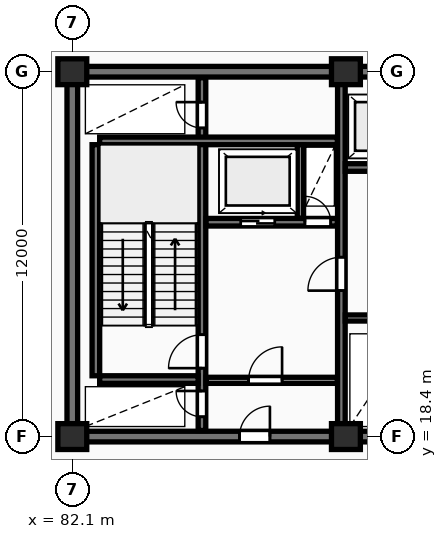
"""IFC4 building model, lengths in metres.
Left out: names, types, materials, properties, quantities, classifications, styles, units other than length and angle.
Written with IfcOpenShell. Run it as: python <this file> out.ifc"""

import sys

from ifc_helpers import new_model, si_unit, direction, frame, frame_2d, origin, origin_2d, place, context, subcontext, project, spatial, rectangle, extrude, element, fill, save


model = new_model("IFC4")
c1 = context("Model", 3, precision=1e-05, world=origin(), true_north=direction((0.0, 1.0)))
c2 = subcontext(c1, "Body", "Model", "MODEL_VIEW")
j1 = project(units=[si_unit("LENGTHUNIT", "METRE"), si_unit("PLANEANGLEUNIT", "RADIAN")], contexts=[c1])
p1 = place(None, origin())
s1 = spatial("IfcSite", under=j1, at=p1, CompositionType="ELEMENT")
p2 = place(p1, origin())
s2 = spatial("IfcBuilding", under=s1, at=p2, CompositionType="ELEMENT")
p3 = place(p2, frame((0.0, 0.0, 76.0)))
s3 = spatial("IfcBuildingStorey", under=s2, at=p3, CompositionType="ELEMENT", Elevation=76.0)
for number, where, z_axis, x_axis in (
    (1, (82.1, 18.4, 0.0), (0.0, 0.0, 1.0), (1.0, 0.0, 0.0)),
    (2, (82.1, 30.4, 0.0), (0.0, 0.0, 1.0), (1.0, 0.0, 0.0)),
    (3, (91.1, 18.4, 0.0), (0.0, 0.0, 1.0), (1.0, 0.0, 0.0)),
    (4, (91.1, 30.4, 0.0), (0.0, 0.0, 1.0), (1.0, 0.0, 0.0)),
):
    element("IfcColumn", number, at=place(p3, frame(where, z_axis=z_axis, x_axis=x_axis)), inside=s3, PredefinedType="COLUMN", context=c2, shape_type="SweptSolid", body=[
        extrude(rectangle(XDim=0.95, YDim=0.85, at=origin_2d()), origin(), (0.0, 0.0, 1.0), 4.8),
    ])
p4 = place(p3, frame((81.925, 30.4, 0.0), z_axis=(0.0, 0.0, 1.0), x_axis=(1.0, 0.0, 0.0)))
e5 = element("IfcWall", 5, at=p4, inside=s3, PredefinedType="SHEAR", context=c2, shape_type="SweptSolid", body=[
    extrude(rectangle(XDim=36.265, YDim=0.35, at=frame_2d((18.132, 0.0))), origin(), (0.0, 0.0, 1.0), 4.8),
])
p5 = place(p3, frame((82.1, 18.575, 0.0), z_axis=(0.0, 0.0, 1.0), x_axis=(0.0, 1.0, 0.0)))
e6 = element("IfcWall", 6, at=p5, inside=s3, PredefinedType="SHEAR", context=c2, shape_type="SweptSolid", body=[
    extrude(rectangle(XDim=11.65, YDim=0.35, at=frame_2d((5.825, 0.0))), origin(), (0.0, 0.0, 1.0), 4.8),
])
p6 = place(p3, frame((81.925, 18.4, 0.0), z_axis=(0.0, 0.0, 1.0), x_axis=(1.0, 0.0, 0.0)))
e7 = element("IfcWall", 7, at=p6, inside=s3, PredefinedType="SHEAR", context=c2, shape_type="SweptSolid", body=[
    extrude(rectangle(XDim=36.265, YDim=0.35, at=frame_2d((18.132, 0.0))), origin(), (0.0, 0.0, 1.0), 4.8),
])
p7 = place(p6, frame((5.675, 0.0, 0.0)))
e8 = element("IfcOpeningElement", 8, at=p7, cuts=e7, PredefinedType="OPENING", context=c2, shape_type="SweptSolid", body=[
    extrude(rectangle(XDim=1.0, YDim=2.15, at=frame_2d((0.5, 1.075))), frame((0.0, 0.185, 0.0), z_axis=(0.0, -1.0, 0.0), x_axis=(1.0, 0.0, 0.0)), (0.0, 0.0, 1.0), 0.37),
])
p8 = place(p6, frame((21.925, 0.0, 0.0)))
e9 = element("IfcOpeningElement", 9, at=p8, cuts=e7, PredefinedType="OPENING", context=c2, shape_type="SweptSolid", body=[
    extrude(rectangle(XDim=1.5, YDim=2.2, at=frame_2d((0.75, 1.1))), frame((0.0, 0.185, 0.0), z_axis=(0.0, -1.0, 0.0), x_axis=(1.0, 0.0, 0.0)), (0.0, 0.0, 1.0), 0.37),
])
p9 = place(p6, frame((29.875, 0.0, 0.0)))
e10 = element("IfcOpeningElement", 10, at=p9, cuts=e7, PredefinedType="OPENING", context=c2, shape_type="SweptSolid", body=[
    extrude(rectangle(XDim=1.0, YDim=2.15, at=frame_2d((0.5, 1.075))), frame((0.0, 0.185, 0.0), z_axis=(0.0, -1.0, 0.0), x_axis=(1.0, 0.0, 0.0)), (0.0, 0.0, 1.0), 0.37),
])
p10 = place(p3, frame((82.875, 20.4, 0.0), z_axis=(0.0, 0.0, 1.0), x_axis=(0.0, 1.0, 0.0)))
e11 = element("IfcWall", 11, at=p10, inside=s3, PredefinedType="SHEAR", context=c2, shape_type="SweptSolid", body=[
    extrude(rectangle(XDim=7.6, YDim=0.25, at=frame_2d((3.8, 0.0))), origin(), (0.0, 0.0, 1.0), 4.8),
])
p11 = place(p3, frame((86.365, 18.6, 0.0), z_axis=(0.0, 0.0, 1.0), x_axis=(0.0, 1.0, 0.0)))
e12 = element("IfcWall", 12, at=p11, inside=s3, PredefinedType="SHEAR", context=c2, shape_type="SweptSolid", body=[
    extrude(rectangle(XDim=11.6, YDim=0.25, at=frame_2d((5.8, 0.0))), origin(), (0.0, 0.0, 1.0), 4.8),
])
p12 = place(p11, frame((0.45, 0.0, 0.0)))
e13 = element("IfcOpeningElement", 13, at=p12, cuts=e12, PredefinedType="OPENING", context=c2, shape_type="SweptSolid", body=[
    extrude(rectangle(XDim=0.85, YDim=2.05, at=frame_2d((0.425, 1.025))), frame((0.0, 0.135, 0.0), z_axis=(0.0, -1.0, 0.0), x_axis=(1.0, 0.0, 0.0)), (0.0, 0.0, 1.0), 0.27),
])
p13 = place(p11, frame((2.05, 0.0, 0.0)))
e14 = element("IfcOpeningElement", 14, at=p13, cuts=e12, PredefinedType="OPENING", context=c2, shape_type="SweptSolid", body=[
    extrude(rectangle(XDim=1.1, YDim=2.1, at=frame_2d((0.55, 1.05))), frame((0.0, 0.135, 0.0), z_axis=(0.0, -1.0, 0.0), x_axis=(1.0, 0.0, 0.0)), (0.0, 0.0, 1.0), 0.27),
])
p14 = place(p11, frame((9.95, 0.0, 0.0)))
e15 = element("IfcOpeningElement", 15, at=p14, cuts=e12, PredefinedType="OPENING", context=c2, shape_type="SweptSolid", body=[
    extrude(rectangle(XDim=0.85, YDim=2.05, at=frame_2d((0.425, 1.025))), frame((0.0, 0.135, 0.0), z_axis=(0.0, -1.0, 0.0), x_axis=(1.0, 0.0, 0.0)), (0.0, 0.0, 1.0), 0.27),
])
p15 = place(p3, frame((83.0, 20.275, 0.0), z_axis=(0.0, 0.0, 1.0), x_axis=(1.0, 0.0, 0.0)))
e16 = element("IfcWall", 16, at=p15, inside=s3, PredefinedType="SHEAR", context=c2, shape_type="SweptSolid", body=[
    extrude(rectangle(XDim=3.24, YDim=0.25, at=frame_2d((1.62, 0.0))), origin(), (0.0, 0.0, 1.0), 4.8),
])
p16 = place(p3, frame((83.0, 28.125, 0.0), z_axis=(0.0, 0.0, 1.0), x_axis=(1.0, 0.0, 0.0)))
e17 = element("IfcWall", 17, at=p16, inside=s3, PredefinedType="SHEAR", context=c2, shape_type="SweptSolid", body=[
    extrude(rectangle(XDim=7.82, YDim=0.25, at=frame_2d((3.91, 0.0))), origin(), (0.0, 0.0, 1.0), 4.8),
])
p17 = place(p3, frame((86.5, 25.45, 0.0), z_axis=(0.0, 0.0, 1.0), x_axis=(1.0, 0.0, 0.0)))
e18 = element("IfcWall", 18, at=p17, inside=s3, PredefinedType="SHEAR", context=c2, shape_type="SweptSolid", body=[
    extrude(rectangle(XDim=4.32, YDim=0.25, at=frame_2d((2.16, 0.0))), origin(), (0.0, 0.0, 1.0), 4.8),
])
p18 = place(p17, frame((1.14, 0.0, 0.0)))
e19 = element("IfcOpeningElement", 19, at=p18, cuts=e18, PredefinedType="OPENING", context=c2, shape_type="SweptSolid", body=[
    extrude(rectangle(XDim=1.12, YDim=2.12, at=frame_2d((0.56, 1.06))), frame((0.0, 0.135, 0.0), z_axis=(0.0, -1.0, 0.0), x_axis=(1.0, 0.0, 0.0)), (0.0, 0.0, 1.0), 0.27),
])
p19 = place(p17, frame((3.25, 0.0, 0.0)))
e20 = element("IfcOpeningElement", 20, at=p19, cuts=e18, PredefinedType="OPENING", context=c2, shape_type="SweptSolid", body=[
    extrude(rectangle(XDim=0.85, YDim=2.05, at=frame_2d((0.425, 1.025))), frame((0.0, 0.135, 0.0), z_axis=(0.0, -1.0, 0.0), x_axis=(1.0, 0.0, 0.0)), (0.0, 0.0, 1.0), 0.27),
])
p20 = place(p3, frame((89.6, 25.58, 0.0), z_axis=(0.0, 0.0, 1.0), x_axis=(0.0, 1.0, 0.0)))
e21 = element("IfcWall", 21, at=p20, inside=s3, PredefinedType="PARTITIONING", context=c2, shape_type="SweptSolid", body=[
    extrude(rectangle(XDim=2.42, YDim=0.2, at=frame_2d((1.21, 0.0))), origin(), (0.0, 0.0, 1.0), 4.48),
])
p21 = place(p3, frame((86.5, 20.25, 0.0), z_axis=(0.0, 0.0, 1.0), x_axis=(1.0, 0.0, 0.0)))
e22 = element("IfcWall", 22, at=p21, inside=s3, PredefinedType="PARTITIONING", context=c2, shape_type="SweptSolid", body=[
    extrude(rectangle(XDim=4.32, YDim=0.2, at=frame_2d((2.16, 0.0))), origin(), (0.0, 0.0, 1.0), 4.48),
])
p22 = place(p21, frame((1.4, 0.0, 0.0)))
e23 = element("IfcOpeningElement", 23, at=p22, cuts=e22, PredefinedType="OPENING", context=c2, shape_type="SweptSolid", body=[
    extrude(rectangle(XDim=1.1, YDim=2.1, at=frame_2d((0.55, 1.05))), frame((0.0, 0.11, 0.0), z_axis=(0.0, -1.0, 0.0), x_axis=(1.0, 0.0, 0.0)), (0.0, 0.0, 1.0), 0.22),
])
p23 = place(p3, frame((90.95, 18.6, 0.0), z_axis=(0.0, 0.0, 1.0), x_axis=(0.0, 1.0, 0.0)))
e24 = element("IfcWall", 24, at=p23, inside=s3, PredefinedType="SHEAR", context=c2, shape_type="SweptSolid", body=[
    extrude(rectangle(XDim=11.6, YDim=0.25, at=frame_2d((5.8, 0.0))), origin(), (0.0, 0.0, 1.0), 4.8),
])
p24 = place(p23, frame((4.6, 0.0, 0.0)))
e25 = element("IfcOpeningElement", 25, at=p24, cuts=e24, PredefinedType="OPENING", context=c2, shape_type="SweptSolid", body=[
    extrude(rectangle(XDim=1.1, YDim=2.1, at=frame_2d((0.55, 1.05))), frame((0.0, 0.135, 0.0), z_axis=(0.0, -1.0, 0.0), x_axis=(1.0, 0.0, 0.0)), (0.0, 0.0, 1.0), 0.27),
])
p25 = place(p3, frame((91.08, 27.25, 0.0), z_axis=(0.0, 0.0, 1.0), x_axis=(1.0, 0.0, 0.0)))
e26 = element("IfcWall", 26, at=p25, inside=s3, PredefinedType="SHEAR", context=c2, shape_type="SweptSolid", body=[
    extrude(rectangle(XDim=8.34, YDim=0.25, at=frame_2d((4.17, 0.0))), origin(), (0.0, 0.0, 1.0), 4.8),
])
p26 = place(p25, frame((0.76, 0.0, 0.0)))
e27 = element("IfcOpeningElement", 27, at=p26, cuts=e26, PredefinedType="OPENING", context=c2, shape_type="SweptSolid", body=[
    extrude(rectangle(XDim=1.12, YDim=2.12, at=frame_2d((0.56, 1.06))), frame((0.0, 0.135, 0.0), z_axis=(0.0, -1.0, 0.0), x_axis=(1.0, 0.0, 0.0)), (0.0, 0.0, 1.0), 0.27),
])
p27 = place(p25, frame((3.56, 0.0, 0.0)))
e28 = element("IfcOpeningElement", 28, at=p27, cuts=e26, PredefinedType="OPENING", context=c2, shape_type="SweptSolid", body=[
    extrude(rectangle(XDim=1.12, YDim=2.12, at=frame_2d((0.56, 1.06))), frame((0.0, 0.135, 0.0), z_axis=(0.0, -1.0, 0.0), x_axis=(1.0, 0.0, 0.0)), (0.0, 0.0, 1.0), 0.27),
])
p28 = place(p25, frame((6.36, 0.0, 0.0)))
e29 = element("IfcOpeningElement", 29, at=p28, cuts=e26, PredefinedType="OPENING", context=c2, shape_type="SweptSolid", body=[
    extrude(rectangle(XDim=1.12, YDim=2.12, at=frame_2d((0.56, 1.06))), frame((0.0, 0.135, 0.0), z_axis=(0.0, -1.0, 0.0), x_axis=(1.0, 0.0, 0.0)), (0.0, 0.0, 1.0), 0.27),
])
p29 = place(p3, frame((91.08, 22.3, 0.0), z_axis=(0.0, 0.0, 1.0), x_axis=(1.0, 0.0, 0.0)))
e30 = element("IfcWall", 30, at=p29, inside=s3, PredefinedType="PARTITIONING", context=c2, shape_type="SweptSolid", body=[
    extrude(rectangle(XDim=19.14, YDim=0.2, at=frame_2d((9.57, 0.0))), origin(), (0.0, 0.0, 1.0), 4.48),
])
p30 = place(p29, frame((1.15, 0.0, 0.0)))
e31 = element("IfcOpeningElement", 31, at=p30, cuts=e30, PredefinedType="OPENING", context=c2, shape_type="SweptSolid", body=[
    extrude(rectangle(XDim=0.85, YDim=2.05, at=frame_2d((0.425, 1.025))), frame((0.0, 0.11, 0.0), z_axis=(0.0, -1.0, 0.0), x_axis=(1.0, 0.0, 0.0)), (0.0, 0.0, 1.0), 0.22),
])
p31 = place(p29, frame((3.2, 0.0, 0.0)))
e32 = element("IfcOpeningElement", 32, at=p31, cuts=e30, PredefinedType="OPENING", context=c2, shape_type="SweptSolid", body=[
    extrude(rectangle(XDim=0.85, YDim=2.05, at=frame_2d((0.425, 1.025))), frame((0.0, 0.11, 0.0), z_axis=(0.0, -1.0, 0.0), x_axis=(1.0, 0.0, 0.0)), (0.0, 0.0, 1.0), 0.22),
])
p32 = place(p29, frame((12.72, 0.0, 0.0)))
e33 = element("IfcOpeningElement", 33, at=p32, cuts=e30, PredefinedType="OPENING", context=c2, shape_type="SweptSolid", body=[
    extrude(rectangle(XDim=1.5, YDim=2.2, at=frame_2d((0.75, 1.1))), frame((0.0, 0.11, 0.0), z_axis=(0.0, -1.0, 0.0), x_axis=(1.0, 0.0, 0.0)), (0.0, 0.0, 1.0), 0.22),
])
p33 = place(p29, frame((5.52, 0.0, 0.0)))
e34 = element("IfcOpeningElement", 34, at=p33, cuts=e30, PredefinedType="OPENING", context=c2, shape_type="SweptSolid", body=[
    extrude(rectangle(XDim=0.88, YDim=2.06, at=frame_2d((0.44, 1.03))), frame((0.0, 0.11, 0.0), z_axis=(0.0, -1.0, 0.0), x_axis=(1.0, 0.0, 0.0)), (0.0, 0.0, 1.0), 0.22),
])
p34 = place(p29, frame((7.67, 0.0, 0.0)))
e35 = element("IfcOpeningElement", 35, at=p34, cuts=e30, PredefinedType="OPENING", context=c2, shape_type="SweptSolid", body=[
    extrude(rectangle(XDim=0.88, YDim=2.06, at=frame_2d((0.44, 1.03))), frame((0.0, 0.11, 0.0), z_axis=(0.0, -1.0, 0.0), x_axis=(1.0, 0.0, 0.0)), (0.0, 0.0, 1.0), 0.22),
])
p35 = place(p29, frame((10.27, 0.0, 0.0)))
e36 = element("IfcOpeningElement", 36, at=p35, cuts=e30, PredefinedType="OPENING", context=c2, shape_type="SweptSolid", body=[
    extrude(rectangle(XDim=0.85, YDim=2.05, at=frame_2d((0.425, 1.025))), frame((0.0, 0.11, 0.0), z_axis=(0.0, -1.0, 0.0), x_axis=(1.0, 0.0, 0.0)), (0.0, 0.0, 1.0), 0.22),
])
p36 = place(p29, frame((15.92, 0.0, 0.0)))
e37 = element("IfcOpeningElement", 37, at=p36, cuts=e30, PredefinedType="OPENING", context=c2, shape_type="SweptSolid", body=[
    extrude(rectangle(XDim=0.96, YDim=2.1, at=frame_2d((0.48, 1.05))), frame((0.0, 0.11, 0.0), z_axis=(0.0, -1.0, 0.0), x_axis=(1.0, 0.0, 0.0)), (0.0, 0.0, 1.0), 0.22),
])
p37 = place(p7, origin())
e38 = element("IfcDoor", 38, at=p37, inside=s3, OperationType="SINGLE_SWING_RIGHT", PredefinedType="DOOR", context=c2, shape_type="SweptSolid", body=[
    extrude(rectangle(XDim=1.0, YDim=2.15, at=frame_2d((0.5, 1.075))), frame((0.0, 0.025, 0.0), z_axis=(0.0, -1.0, 0.0), x_axis=(1.0, 0.0, 0.0)), (0.0, 0.0, 1.0), 0.05),
])
fill(e8, e38)
p38 = place(p12, origin())
e39 = element("IfcDoor", 39, at=p38, inside=s3, OperationType="SINGLE_SWING_RIGHT", PredefinedType="DOOR", context=c2, shape_type="SweptSolid", body=[
    extrude(rectangle(XDim=0.85, YDim=2.05, at=frame_2d((0.425, 1.025))), frame((0.0, 0.025, 0.0), z_axis=(0.0, -1.0, 0.0), x_axis=(1.0, 0.0, 0.0)), (0.0, 0.0, 1.0), 0.05),
])
fill(e13, e39)
p39 = place(p13, origin())
e40 = element("IfcDoor", 40, at=p39, inside=s3, OperationType="SINGLE_SWING_LEFT", PredefinedType="DOOR", context=c2, shape_type="SweptSolid", body=[
    extrude(rectangle(XDim=1.1, YDim=2.1, at=frame_2d((0.55, 1.05))), frame((0.0, 0.025, 0.0), z_axis=(0.0, -1.0, 0.0), x_axis=(1.0, 0.0, 0.0)), (0.0, 0.0, 1.0), 0.05),
])
fill(e14, e40)
p40 = place(p14, origin())
e41 = element("IfcDoor", 41, at=p40, inside=s3, OperationType="SINGLE_SWING_RIGHT", PredefinedType="DOOR", context=c2, shape_type="SweptSolid", body=[
    extrude(rectangle(XDim=0.85, YDim=2.05, at=frame_2d((0.425, 1.025))), frame((0.0, 0.025, 0.0), z_axis=(0.0, -1.0, 0.0), x_axis=(1.0, 0.0, 0.0)), (0.0, 0.0, 1.0), 0.05),
])
fill(e15, e41)
p41 = place(p18, origin())
e42 = element("IfcDoor", 42, at=p41, inside=s3, OperationType="SLIDING_TO_RIGHT", PredefinedType="DOOR", context=c2, shape_type="SweptSolid", body=[
    extrude(rectangle(XDim=1.12, YDim=2.12, at=frame_2d((0.56, 1.06))), frame((0.0, 0.025, 0.0), z_axis=(0.0, -1.0, 0.0), x_axis=(1.0, 0.0, 0.0)), (0.0, 0.0, 1.0), 0.05),
])
fill(e19, e42)
p42 = place(p19, origin())
e43 = element("IfcDoor", 43, at=p42, inside=s3, OperationType="SINGLE_SWING_LEFT", PredefinedType="DOOR", context=c2, shape_type="SweptSolid", body=[
    extrude(rectangle(XDim=0.85, YDim=2.05, at=frame_2d((0.425, 1.025))), frame((0.0, 0.025, 0.0), z_axis=(0.0, -1.0, 0.0), x_axis=(1.0, 0.0, 0.0)), (0.0, 0.0, 1.0), 0.05),
])
fill(e20, e43)
p43 = place(p22, origin())
e44 = element("IfcDoor", 44, at=p43, inside=s3, OperationType="SINGLE_SWING_RIGHT", PredefinedType="DOOR", context=c2, shape_type="SweptSolid", body=[
    extrude(rectangle(XDim=1.1, YDim=2.1, at=frame_2d((0.55, 1.05))), frame((0.0, 0.025, 0.0), z_axis=(0.0, -1.0, 0.0), x_axis=(1.0, 0.0, 0.0)), (0.0, 0.0, 1.0), 0.05),
])
fill(e23, e44)
p44 = place(p24, origin())
e45 = element("IfcDoor", 45, at=p44, inside=s3, OperationType="SINGLE_SWING_LEFT", PredefinedType="DOOR", context=c2, shape_type="SweptSolid", body=[
    extrude(rectangle(XDim=1.1, YDim=2.1, at=frame_2d((0.55, 1.05))), frame((0.0, 0.025, 0.0), z_axis=(0.0, -1.0, 0.0), x_axis=(1.0, 0.0, 0.0)), (0.0, 0.0, 1.0), 0.05),
])
fill(e25, e45)
save(model, sys.argv[1])
